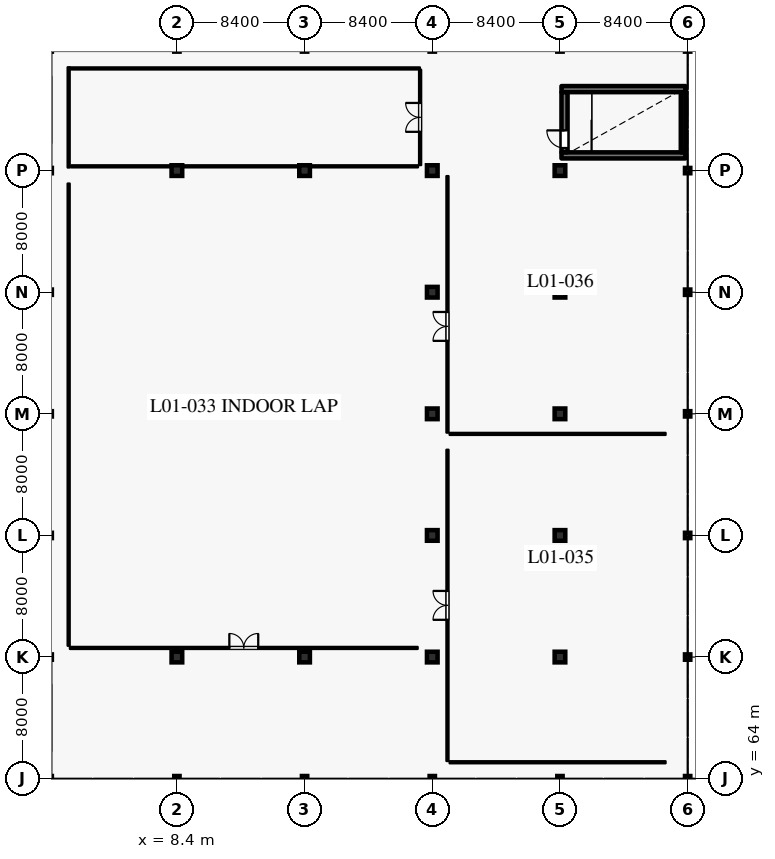
"""IFC4 building model, lengths in metres.
Left out: names, types, materials, properties, quantities, classifications, styles, units other than length and angle.
Written with IfcOpenShell. Run it as: python <this file> out.ifc"""

import sys

from ifc_helpers import new_model, si_unit, direction, frame, frame_2d, origin, origin_2d, place, context, subcontext, project, spatial, rectangle, hollow_rectangle, extrude, element, fill, save


model = new_model("IFC4")
c1 = context("Model", 3, precision=1e-05, world=origin(), true_north=direction((0.0, 1.0)))
c2 = subcontext(c1, "Body", "Model", "MODEL_VIEW")
j1 = project(units=[si_unit("LENGTHUNIT", "METRE"), si_unit("PLANEANGLEUNIT", "RADIAN")], contexts=[c1])
p1 = place(None, origin())
s1 = spatial("IfcSite", under=j1, at=p1, CompositionType="ELEMENT")
p2 = place(p1, origin())
s2 = spatial("IfcBuilding", under=s1, at=p2, CompositionType="ELEMENT")
p3 = place(p2, frame((0.0, 0.0, 6.0)))
s3 = spatial("IfcBuildingStorey", under=s2, at=p3, CompositionType="ELEMENT", Elevation=6.0)
p4 = place(p3, frame((8.4, 64.0, 0.0), z_axis=(0.0, 0.0, 1.0), x_axis=(1.0, 0.0, 0.0)))
e1 = element("IfcColumn", 1, at=p4, inside=s3, PredefinedType="COLUMN", context=c2, shape_type="SweptSolid", body=[
    extrude(hollow_rectangle(XDim=0.35, YDim=0.35, WallThickness=0.016, at=origin_2d()), origin(), (0.0, 0.0, 1.0), 5.4),
])
for number, where, z_axis, x_axis in (
    (2, (8.4, 72.0, 0.0), (0.0, 0.0, 1.0), (1.0, 0.0, 0.0)),
    (3, (8.4, 104.0, 0.0), (0.0, 0.0, 1.0), (1.0, 0.0, 0.0)),
):
    element("IfcColumn", number, at=place(p3, frame(where, z_axis=z_axis, x_axis=x_axis)), inside=s3, PredefinedType="COLUMN", context=c2, shape_type="SweptSolid", body=[
        extrude(rectangle(XDim=0.7, YDim=0.7, at=origin_2d()), origin(), (0.0, 0.0, 1.0), 5.4),
    ])
p5 = place(p3, frame((16.8, 64.0, 0.0), z_axis=(0.0, 0.0, 1.0), x_axis=(1.0, 0.0, 0.0)))
e4 = element("IfcColumn", 4, at=p5, inside=s3, PredefinedType="COLUMN", context=c2, shape_type="SweptSolid", body=[
    extrude(hollow_rectangle(XDim=0.35, YDim=0.35, WallThickness=0.016, at=origin_2d()), origin(), (0.0, 0.0, 1.0), 5.4),
])
for number, where, z_axis, x_axis in (
    (5, (16.8, 72.0, 0.0), (0.0, 0.0, 1.0), (1.0, 0.0, 0.0)),
    (6, (16.8, 104.0, 0.0), (0.0, 0.0, 1.0), (1.0, 0.0, 0.0)),
):
    element("IfcColumn", number, at=place(p3, frame(where, z_axis=z_axis, x_axis=x_axis)), inside=s3, PredefinedType="COLUMN", context=c2, shape_type="SweptSolid", body=[
        extrude(rectangle(XDim=0.7, YDim=0.7, at=origin_2d()), origin(), (0.0, 0.0, 1.0), 5.4),
    ])
p6 = place(p3, frame((25.2, 64.0, 0.0), z_axis=(0.0, 0.0, 1.0), x_axis=(1.0, 0.0, 0.0)))
e7 = element("IfcColumn", 7, at=p6, inside=s3, PredefinedType="COLUMN", context=c2, shape_type="SweptSolid", body=[
    extrude(hollow_rectangle(XDim=0.35, YDim=0.35, WallThickness=0.016, at=origin_2d()), origin(), (0.0, 0.0, 1.0), 5.4),
])
for number, where, z_axis, x_axis in (
    (8, (25.2, 72.0, 0.0), (0.0, 0.0, 1.0), (1.0, 0.0, 0.0)),
    (9, (25.2, 80.0, 0.0), (0.0, 0.0, 1.0), (1.0, 0.0, 0.0)),
    (10, (25.2, 88.0, 0.0), (0.0, 0.0, 1.0), (1.0, 0.0, 0.0)),
    (11, (25.2, 96.0, 0.0), (0.0, 0.0, 1.0), (1.0, 0.0, 0.0)),
    (12, (25.2, 104.0, 0.0), (0.0, 0.0, 1.0), (1.0, 0.0, 0.0)),
):
    element("IfcColumn", number, at=place(p3, frame(where, z_axis=z_axis, x_axis=x_axis)), inside=s3, PredefinedType="COLUMN", context=c2, shape_type="SweptSolid", body=[
        extrude(rectangle(XDim=0.7, YDim=0.7, at=origin_2d()), origin(), (0.0, 0.0, 1.0), 5.4),
    ])
p7 = place(p3, frame((33.6, 64.0, 0.0), z_axis=(0.0, 0.0, 1.0), x_axis=(1.0, 0.0, 0.0)))
e13 = element("IfcColumn", 13, at=p7, inside=s3, PredefinedType="COLUMN", context=c2, shape_type="SweptSolid", body=[
    extrude(hollow_rectangle(XDim=0.35, YDim=0.35, WallThickness=0.016, at=origin_2d()), origin(), (0.0, 0.0, 1.0), 5.4),
])
for number, where, z_axis, x_axis in (
    (14, (33.6, 72.0, 0.0), (0.0, 0.0, 1.0), (1.0, 0.0, 0.0)),
    (15, (33.6, 80.0, 0.0), (0.0, 0.0, 1.0), (1.0, 0.0, 0.0)),
    (16, (33.6, 88.0, 0.0), (0.0, 0.0, 1.0), (1.0, 0.0, 0.0)),
    (17, (33.6, 96.0, 0.0), (0.0, 0.0, 1.0), (1.0, 0.0, 0.0)),
    (18, (33.6, 104.0, 0.0), (0.0, 0.0, 1.0), (1.0, 0.0, 0.0)),
):
    element("IfcColumn", number, at=place(p3, frame(where, z_axis=z_axis, x_axis=x_axis)), inside=s3, PredefinedType="COLUMN", context=c2, shape_type="SweptSolid", body=[
        extrude(rectangle(XDim=0.7, YDim=0.7, at=origin_2d()), origin(), (0.0, 0.0, 1.0), 5.4),
    ])
for number, where, z_axis, x_axis in (
    (19, (42.0, 64.0, 0.0), (0.0, 0.0, 1.0), (1.0, 0.0, 0.0)),
    (20, (42.0, 72.0, 0.0), (0.0, 0.0, 1.0), (1.0, 0.0, 0.0)),
    (21, (42.0, 80.0, 0.0), (0.0, 0.0, 1.0), (1.0, 0.0, 0.0)),
    (22, (42.0, 88.0, 0.0), (0.0, 0.0, 1.0), (1.0, 0.0, 0.0)),
    (23, (42.0, 96.0, 0.0), (0.0, 0.0, 1.0), (1.0, 0.0, 0.0)),
    (24, (42.0, 104.0, 0.0), (0.0, 0.0, 1.0), (1.0, 0.0, 0.0)),
):
    element("IfcColumn", number, at=place(p3, frame(where, z_axis=z_axis, x_axis=x_axis)), inside=s3, PredefinedType="COLUMN", context=c2, shape_type="SweptSolid", body=[
        extrude(hollow_rectangle(XDim=0.35, YDim=0.35, WallThickness=0.016, at=origin_2d()), origin(), (0.0, 0.0, 1.0), 5.4),
    ])
p8 = place(p3, frame((33.7, 105.0, 0.0), z_axis=(0.0, 0.0, 1.0), x_axis=(1.0, 0.0, 0.0)))
e25 = element("IfcWall", 25, at=p8, inside=s3, PredefinedType="SHEAR", context=c2, shape_type="SweptSolid", body=[
    extrude(rectangle(XDim=8.15, YDim=0.4, at=frame_2d((4.075, 0.0))), origin(), (0.0, 0.0, 1.0), 5.045),
])
p9 = place(p3, frame((41.7, 105.205, 0.0), z_axis=(0.0, 0.0, 1.0), x_axis=(0.0, 1.0, 0.0)))
e26 = element("IfcWall", 26, at=p9, inside=s3, PredefinedType="SHEAR", context=c2, shape_type="SweptSolid", body=[
    extrude(rectangle(XDim=3.95, YDim=0.3, at=frame_2d((1.975, 0.0))), origin(), (0.0, 0.0, 1.0), 5.045),
])
p10 = place(p3, frame((33.7, 109.36, 0.0), z_axis=(0.0, 0.0, 1.0), x_axis=(1.0, 0.0, 0.0)))
e27 = element("IfcWall", 27, at=p10, inside=s3, PredefinedType="SHEAR", context=c2, shape_type="SweptSolid", body=[
    extrude(rectangle(XDim=8.15, YDim=0.4, at=frame_2d((4.075, 0.0))), origin(), (0.0, 0.0, 1.0), 5.045),
])
p11 = place(p3, frame((33.9, 105.205, 0.0), z_axis=(0.0, 0.0, 1.0), x_axis=(0.0, 1.0, 0.0)))
e28 = element("IfcWall", 28, at=p11, inside=s3, PredefinedType="SHEAR", context=c2, shape_type="SweptSolid", body=[
    extrude(rectangle(XDim=3.95, YDim=0.4, at=frame_2d((1.975, 0.0))), origin(), (0.0, 0.0, 1.0), 5.045),
])
p12 = place(p11, frame((0.28, 0.0, 0.0)))
e29 = element("IfcOpeningElement", 29, at=p12, cuts=e28, PredefinedType="OPENING", context=c2, shape_type="SweptSolid", body=[
    extrude(rectangle(XDim=1.16, YDim=2.2, at=frame_2d((0.58, 1.1))), frame((0.0, 0.21, 0.0), z_axis=(0.0, -1.0, 0.0), x_axis=(1.0, 0.0, 0.0)), (0.0, 0.0, 1.0), 0.42),
])
p13 = place(p3, frame((1.36, 72.6, 0.0), z_axis=(0.0, 0.0, 1.0), x_axis=(1.0, 0.0, 0.0)))
e30 = element("IfcWall", 30, at=p13, inside=s3, PredefinedType="PARTITIONING", context=c2, shape_type="SweptSolid", body=[
    extrude(rectangle(XDim=22.88, YDim=0.14, at=frame_2d((11.44, 0.0))), origin(), (0.0, 0.0, 1.0), 5.045),
])
p14 = place(p13, frame((10.49, 0.0, 0.0)))
e31 = element("IfcOpeningElement", 31, at=p14, cuts=e30, PredefinedType="OPENING", context=c2, shape_type="SweptSolid", body=[
    extrude(rectangle(XDim=1.9, YDim=2.4, at=frame_2d((0.95, 1.2))), frame((0.0, 0.08, 0.0), z_axis=(0.0, -1.0, 0.0), x_axis=(1.0, 0.0, 0.0)), (0.0, 0.0, 1.0), 0.16),
])
p15 = place(p3, frame((1.28, 72.74, 0.0), z_axis=(0.0, 0.0, 1.0), x_axis=(0.0, 1.0, 0.0)))
e32 = element("IfcWall", 32, at=p15, inside=s3, PredefinedType="PARTITIONING", context=c2, shape_type="SweptSolid", body=[
    extrude(rectangle(XDim=30.41, YDim=0.14, at=frame_2d((15.205, 0.0))), origin(), (0.0, 0.0, 1.0), 5.045),
])
p16 = place(p3, frame((26.2, 65.16, 0.0), z_axis=(0.0, 0.0, 1.0), x_axis=(0.0, 1.0, 0.0)))
e33 = element("IfcWall", 33, at=p16, inside=s3, PredefinedType="PARTITIONING", context=c2, shape_type="SweptSolid", body=[
    extrude(rectangle(XDim=20.48, YDim=0.14, at=frame_2d((10.24, 0.0))), origin(), (0.0, 0.0, 1.0), 5.045),
])
p17 = place(p16, frame((9.29, 0.0, 0.0)))
e34 = element("IfcOpeningElement", 34, at=p17, cuts=e33, PredefinedType="OPENING", context=c2, shape_type="SweptSolid", body=[
    extrude(rectangle(XDim=1.9, YDim=2.4, at=frame_2d((0.95, 1.2))), frame((0.0, 0.08, 0.0), z_axis=(0.0, -1.0, 0.0), x_axis=(1.0, 0.0, 0.0)), (0.0, 0.0, 1.0), 0.16),
])
p18 = place(p3, frame((26.34, 65.08, 0.0), z_axis=(0.0, 0.0, 1.0), x_axis=(1.0, 0.0, 0.0)))
e35 = element("IfcWall", 35, at=p18, inside=s3, PredefinedType="PARTITIONING", context=c2, shape_type="SweptSolid", body=[
    extrude(rectangle(XDim=14.21, YDim=0.14, at=frame_2d((7.105, 0.0))), origin(), (0.0, 0.0, 1.0), 5.045),
])
p19 = place(p3, frame((26.2, 86.76, 0.0), z_axis=(0.0, 0.0, 1.0), x_axis=(0.0, 1.0, 0.0)))
e36 = element("IfcWall", 36, at=p19, inside=s3, PredefinedType="PARTITIONING", context=c2, shape_type="SweptSolid", body=[
    extrude(rectangle(XDim=16.88, YDim=0.14, at=frame_2d((8.44, 0.0))), origin(), (0.0, 0.0, 1.0), 5.045),
])
p20 = place(p19, frame((6.04, 0.0, 0.0)))
e37 = element("IfcOpeningElement", 37, at=p20, cuts=e36, PredefinedType="OPENING", context=c2, shape_type="SweptSolid", body=[
    extrude(rectangle(XDim=1.9, YDim=2.4, at=frame_2d((0.95, 1.2))), frame((0.0, 0.08, 0.0), z_axis=(0.0, -1.0, 0.0), x_axis=(1.0, 0.0, 0.0)), (0.0, 0.0, 1.0), 0.16),
])
p21 = place(p3, frame((26.34, 86.68, 0.0), z_axis=(0.0, 0.0, 1.0), x_axis=(1.0, 0.0, 0.0)))
e38 = element("IfcWall", 38, at=p21, inside=s3, PredefinedType="PARTITIONING", context=c2, shape_type="SweptSolid", body=[
    extrude(rectangle(XDim=14.21, YDim=0.14, at=frame_2d((7.105, 0.0))), origin(), (0.0, 0.0, 1.0), 5.045),
])
p22 = place(p3, frame((24.4, 104.36, 0.0), z_axis=(0.0, 0.0, 1.0), x_axis=(0.0, 1.0, 0.0)))
e39 = element("IfcWall", 39, at=p22, inside=s3, PredefinedType="PARTITIONING", context=c2, shape_type="SweptSolid", body=[
    extrude(rectangle(XDim=6.28, YDim=0.14, at=frame_2d((3.14, 0.0))), origin(), (0.0, 0.0, 1.0), 5.045),
])
p23 = place(p22, frame((2.19, 0.0, 0.0)))
e40 = element("IfcOpeningElement", 40, at=p23, cuts=e39, PredefinedType="OPENING", context=c2, shape_type="SweptSolid", body=[
    extrude(rectangle(XDim=1.9, YDim=2.4, at=frame_2d((0.95, 1.2))), frame((0.0, 0.08, 0.0), z_axis=(0.0, -1.0, 0.0), x_axis=(1.0, 0.0, 0.0)), (0.0, 0.0, 1.0), 0.16),
])
p24 = place(p3, frame((1.45, 104.28, 0.0), z_axis=(0.0, 0.0, 1.0), x_axis=(1.0, 0.0, 0.0)))
e41 = element("IfcWall", 41, at=p24, inside=s3, PredefinedType="PARTITIONING", context=c2, shape_type="SweptSolid", body=[
    extrude(rectangle(XDim=22.81, YDim=0.14, at=frame_2d((11.405, 0.0))), origin(), (0.0, 0.0, 1.0), 5.045),
])
p25 = place(p3, frame((1.28, 104.2, 0.0), z_axis=(0.0, 0.0, 1.0), x_axis=(0.0, 1.0, 0.0)))
e42 = element("IfcWall", 42, at=p25, inside=s3, PredefinedType="PARTITIONING", context=c2, shape_type="SweptSolid", body=[
    extrude(rectangle(XDim=6.6, YDim=0.14, at=frame_2d((3.3, 0.0))), origin(), (0.0, 0.0, 1.0), 5.045),
])
p26 = place(p3, frame((1.35, 110.72, 0.0), z_axis=(0.0, 0.0, 1.0), x_axis=(1.0, 0.0, 0.0)))
e43 = element("IfcWall", 43, at=p26, inside=s3, PredefinedType="PARTITIONING", context=c2, shape_type="SweptSolid", body=[
    extrude(rectangle(XDim=23.038, YDim=0.14, at=frame_2d((11.519, 0.0))), origin(), (0.0, 0.0, 1.0), 5.045),
])
p27 = place(p12, origin())
e44 = element("IfcDoor", 44, at=p27, inside=s3, OperationType="SINGLE_SWING_RIGHT", PredefinedType="DOOR", context=c2, shape_type="SweptSolid", body=[
    extrude(rectangle(XDim=1.16, YDim=2.2, at=frame_2d((0.58, 1.1))), frame((0.0, 0.025, 0.0), z_axis=(0.0, -1.0, 0.0), x_axis=(1.0, 0.0, 0.0)), (0.0, 0.0, 1.0), 0.05),
])
fill(e29, e44)
p28 = place(p14, origin())
e45 = element("IfcDoor", 45, at=p28, inside=s3, OperationType="DOUBLE_DOOR_SINGLE_SWING", PredefinedType="DOOR", context=c2, shape_type="SweptSolid", body=[
    extrude(rectangle(XDim=1.9, YDim=2.4, at=frame_2d((0.95, 1.2))), frame((0.0, 0.025, 0.0), z_axis=(0.0, -1.0, 0.0), x_axis=(1.0, 0.0, 0.0)), (0.0, 0.0, 1.0), 0.05),
])
fill(e31, e45)
p29 = place(p17, origin())
e46 = element("IfcDoor", 46, at=p29, inside=s3, OperationType="DOUBLE_DOOR_SINGLE_SWING", PredefinedType="DOOR", context=c2, shape_type="SweptSolid", body=[
    extrude(rectangle(XDim=1.9, YDim=2.4, at=frame_2d((0.95, 1.2))), frame((0.0, 0.025, 0.0), z_axis=(0.0, -1.0, 0.0), x_axis=(1.0, 0.0, 0.0)), (0.0, 0.0, 1.0), 0.05),
])
fill(e34, e46)
p30 = place(p20, origin())
e47 = element("IfcDoor", 47, at=p30, inside=s3, OperationType="DOUBLE_DOOR_SINGLE_SWING", PredefinedType="DOOR", context=c2, shape_type="SweptSolid", body=[
    extrude(rectangle(XDim=1.9, YDim=2.4, at=frame_2d((0.95, 1.2))), frame((0.0, 0.025, 0.0), z_axis=(0.0, -1.0, 0.0), x_axis=(1.0, 0.0, 0.0)), (0.0, 0.0, 1.0), 0.05),
])
fill(e37, e47)
p31 = place(p23, origin())
e48 = element("IfcDoor", 48, at=p31, inside=s3, OperationType="DOUBLE_DOOR_SINGLE_SWING", PredefinedType="DOOR", context=c2, shape_type="SweptSolid", body=[
    extrude(rectangle(XDim=1.9, YDim=2.4, at=frame_2d((0.95, 1.2))), frame((0.0, 0.025, 0.0), z_axis=(0.0, -1.0, 0.0), x_axis=(1.0, 0.0, 0.0)), (0.0, 0.0, 1.0), 0.05),
])
fill(e40, e48)
save(model, sys.argv[1])
